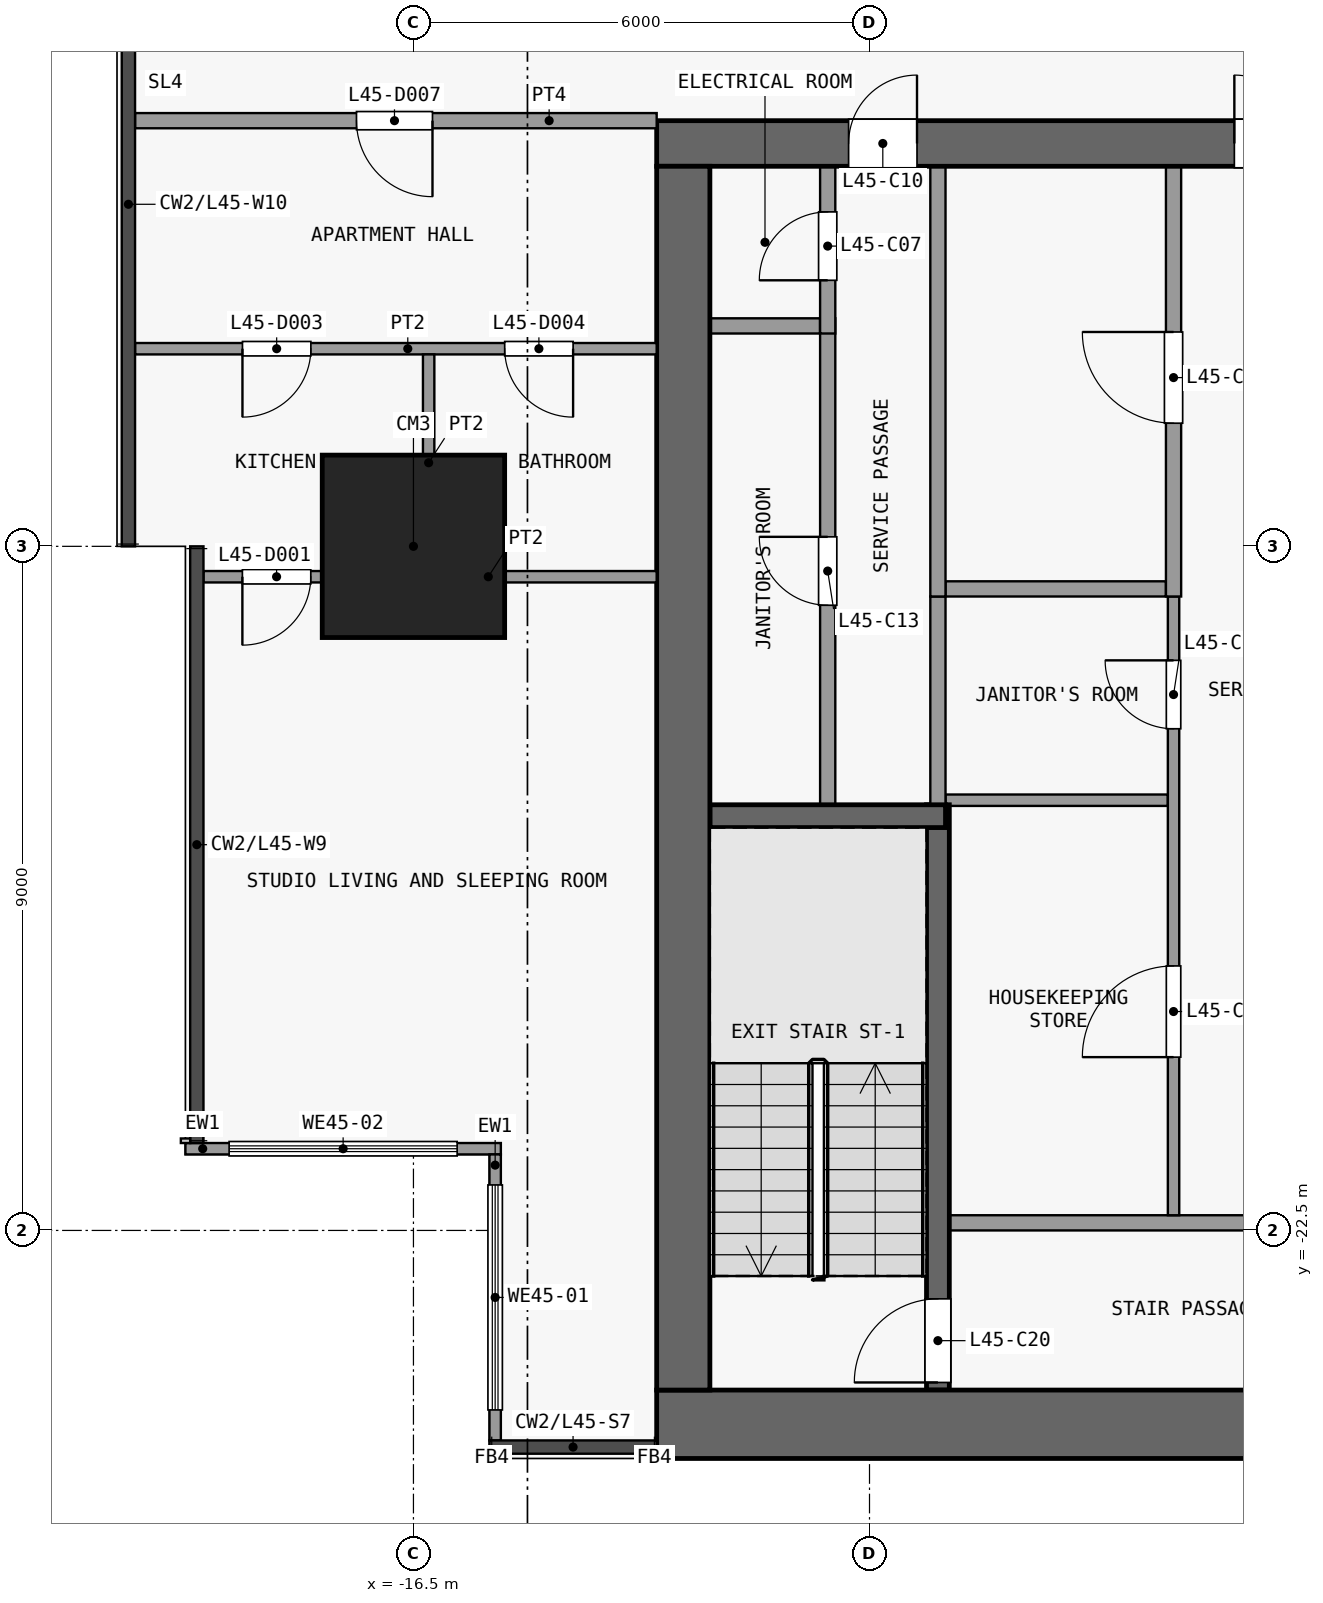
"""IFC4 building model, lengths in metres.
Left out: names, types, materials, properties, quantities, classifications, styles, units other than length and angle.
Written with IfcOpenShell. Run it as: python <this file> out.ifc"""

import sys

from ifc_helpers import new_model, si_unit, direction, frame, frame_2d, origin, origin_2d, place, context, subcontext, project, spatial, rectangle, extrude, element, fill, save


model = new_model("IFC4")
c1 = context("Model", 3, precision=1e-05, world=origin(), true_north=direction((0.0, 1.0)))
c2 = subcontext(c1, "Body", "Model", "MODEL_VIEW")
j1 = project(units=[si_unit("LENGTHUNIT", "METRE"), si_unit("PLANEANGLEUNIT", "RADIAN")], contexts=[c1])
p1 = place(None, origin())
s1 = spatial("IfcSite", under=j1, at=p1, CompositionType="ELEMENT")
p2 = place(p1, origin())
s2 = spatial("IfcBuilding", under=s1, at=p2, CompositionType="ELEMENT")
p3 = place(p2, frame((0.0, 0.0, 181.7)))
s3 = spatial("IfcBuildingStorey", under=s2, at=p3, CompositionType="ELEMENT", Elevation=181.7)
p4 = place(p3, frame((-16.5, -13.5, 0.0), z_axis=(0.0, 0.0, 1.0), x_axis=(1.0, 0.0, 0.0)))
e1 = element("IfcColumn", 1, at=p4, inside=s3, PredefinedType="COLUMN", context=c2, shape_type="SweptSolid", body=[
    extrude(rectangle(XDim=2.4, YDim=2.4, at=origin_2d()), origin(), (0.0, 0.0, 1.0), 3.6),
])
p5 = place(p3, frame((-13.3, -25.05, 0.0), z_axis=(0.0, 0.0, 1.0), x_axis=(1.0, 0.0, 0.0)))
e2 = element("IfcWall", 2, at=p5, inside=s3, PredefinedType="SHEAR", context=c2, shape_type="SweptSolid", body=[
    extrude(rectangle(XDim=26.6, YDim=0.9, at=frame_2d((13.3, 0.0))), origin(), (0.0, 0.0, 1.0), 3.3),
])
p6 = place(p3, frame((-13.3, -8.2, 0.0), z_axis=(0.0, 0.0, 1.0), x_axis=(1.0, 0.0, 0.0)))
e3 = element("IfcWall", 3, at=p6, inside=s3, PredefinedType="SHEAR", context=c2, shape_type="SweptSolid", body=[
    extrude(rectangle(XDim=26.6, YDim=0.6, at=frame_2d((13.3, 0.0))), origin(), (0.0, 0.0, 1.0), 3.3),
])
p7 = place(p6, frame((7.6, 0.0, 0.0)))
e4 = element("IfcOpeningElement", 4, at=p7, cuts=e3, PredefinedType="OPENING", context=c2, shape_type="SweptSolid", body=[
    extrude(rectangle(XDim=1.8, YDim=2.1, at=frame_2d((0.9, 1.05))), frame((0.0, 0.31, 0.0), z_axis=(0.0, -1.0, 0.0), x_axis=(1.0, 0.0, 0.0)), (0.0, 0.0, 1.0), 0.62),
])
p8 = place(p6, frame((17.2, 0.0, 0.0)))
e5 = element("IfcOpeningElement", 5, at=p8, cuts=e3, PredefinedType="OPENING", context=c2, shape_type="SweptSolid", body=[
    extrude(rectangle(XDim=1.8, YDim=2.1, at=frame_2d((0.9, 1.05))), frame((0.0, 0.31, 0.0), z_axis=(0.0, -1.0, 0.0), x_axis=(1.0, 0.0, 0.0)), (0.0, 0.0, 1.0), 0.62),
])
p9 = place(p6, frame((2.525, 0.0, 0.0)))
e6 = element("IfcOpeningElement", 6, at=p9, cuts=e3, PredefinedType="OPENING", context=c2, shape_type="SweptSolid", body=[
    extrude(rectangle(XDim=0.9, YDim=2.1, at=frame_2d((0.45, 1.05))), frame((0.0, 0.31, 0.0), z_axis=(0.0, -1.0, 0.0), x_axis=(1.0, 0.0, 0.0)), (0.0, 0.0, 1.0), 0.62),
])
p10 = place(p6, frame((23.175, 0.0, 0.0)))
e7 = element("IfcOpeningElement", 7, at=p10, cuts=e3, PredefinedType="OPENING", context=c2, shape_type="SweptSolid", body=[
    extrude(rectangle(XDim=0.9, YDim=2.1, at=frame_2d((0.45, 1.05))), frame((0.0, 0.31, 0.0), z_axis=(0.0, -1.0, 0.0), x_axis=(1.0, 0.0, 0.0)), (0.0, 0.0, 1.0), 0.62),
])
p11 = place(p3, frame((-12.95, -24.6, 0.0), z_axis=(0.0, 0.0, 1.0), x_axis=(0.0, 1.0, 0.0)))
e8 = element("IfcWall", 8, at=p11, inside=s3, PredefinedType="SHEAR", context=c2, shape_type="SweptSolid", body=[
    extrude(rectangle(XDim=16.1, YDim=0.7, at=frame_2d((8.05, 0.0))), origin(), (0.0, 0.0, 1.0), 3.3),
])
p12 = place(p3, frame((-3.25, -22.4, 0.0), z_axis=(0.0, 0.0, 1.0), x_axis=(-1.0, 0.0, 0.0)))
e9 = element("IfcWall", 9, at=p12, inside=s3, PredefinedType="PARTITIONING", context=c2, shape_type="SweptSolid", body=[
    extrude(rectangle(XDim=6.2, YDim=0.2, at=frame_2d((3.1, 0.0))), origin(), (0.0, 0.0, 1.0), 3.3),
])
p13 = place(p12, frame((0.8, 0.0, 0.0)))
e10 = element("IfcOpeningElement", 10, at=p13, cuts=e9, PredefinedType="OPENING", context=c2, shape_type="SweptSolid", body=[
    extrude(rectangle(XDim=1.5, YDim=2.1, at=frame_2d((0.75, 1.05))), frame((0.0, 0.11, 0.0), z_axis=(0.0, -1.0, 0.0), x_axis=(1.0, 0.0, 0.0)), (0.0, 0.0, 1.0), 0.22),
])
p14 = place(p3, frame((-12.6, -17.05, 0.0), z_axis=(0.0, 0.0, 1.0), x_axis=(1.0, 0.0, 0.0)))
e11 = element("IfcWall", 11, at=p14, inside=s3, PredefinedType="SHEAR", context=c2, shape_type="SweptSolid", body=[
    extrude(rectangle(XDim=3.1, YDim=0.3, at=frame_2d((1.55, 0.0))), origin(), (0.0, 0.0, 1.0), 3.3),
])
p15 = place(p3, frame((-9.5, -16.84, 0.0), z_axis=(0.0, 0.0, 1.0), x_axis=(1.0, 0.0, 0.0)))
e12 = element("IfcWall", 12, at=p15, inside=s3, PredefinedType="PARTITIONING", context=c2, shape_type="SweptSolid", body=[
    extrude(rectangle(XDim=2.925, YDim=0.15, at=frame_2d((1.462, 0.0))), origin(), (0.0, 0.0, 1.0), 3.3),
])
p16 = place(p3, frame((-9.5, -14.06, 0.0), z_axis=(0.0, 0.0, 1.0), x_axis=(1.0, 0.0, 0.0)))
e13 = element("IfcWall", 13, at=p16, inside=s3, PredefinedType="PARTITIONING", context=c2, shape_type="SweptSolid", body=[
    extrude(rectangle(XDim=2.9, YDim=0.2, at=frame_2d((1.45, 0.0))), origin(), (0.0, 0.0, 1.0), 3.3),
])
p17 = place(p3, frame((-12.6, -10.6, 0.0), z_axis=(0.0, 0.0, 1.0), x_axis=(1.0, 0.0, 0.0)))
e14 = element("IfcWall", 14, at=p17, inside=s3, PredefinedType="PARTITIONING", context=c2, shape_type="SweptSolid", body=[
    extrude(rectangle(XDim=1.45, YDim=0.2, at=frame_2d((0.725, 0.0))), origin(), (0.0, 0.0, 1.0), 3.3),
])
p18 = place(p3, frame((-11.05, -16.9, 0.0), z_axis=(0.0, 0.0, 1.0), x_axis=(0.0, 1.0, 0.0)))
e15 = element("IfcWall", 15, at=p18, inside=s3, PredefinedType="PARTITIONING", context=c2, shape_type="SweptSolid", body=[
    extrude(rectangle(XDim=6.4, YDim=0.2, at=frame_2d((3.2, 0.0))), origin(), (0.0, 0.0, 1.0), 3.3),
])
p19 = place(p18, frame((2.625, 0.0, 0.0)))
e16 = element("IfcOpeningElement", 16, at=p19, cuts=e15, PredefinedType="OPENING", context=c2, shape_type="SweptSolid", body=[
    extrude(rectangle(XDim=0.9, YDim=2.1, at=frame_2d((0.45, 1.05))), frame((0.0, 0.11, 0.0), z_axis=(0.0, -1.0, 0.0), x_axis=(1.0, 0.0, 0.0)), (0.0, 0.0, 1.0), 0.22),
])
p20 = place(p3, frame((-11.05, -10.7, 0.0), z_axis=(0.0, 0.0, 1.0), x_axis=(0.0, 1.0, 0.0)))
e17 = element("IfcWall", 17, at=p20, inside=s3, PredefinedType="PARTITIONING", context=c2, shape_type="SweptSolid", body=[
    extrude(rectangle(XDim=2.2, YDim=0.2, at=frame_2d((1.1, 0.0))), origin(), (0.0, 0.0, 1.0), 3.3),
])
p21 = place(p20, frame((0.7, 0.0, 0.0)))
e18 = element("IfcOpeningElement", 18, at=p21, cuts=e17, PredefinedType="OPENING", context=c2, shape_type="SweptSolid", body=[
    extrude(rectangle(XDim=0.9, YDim=2.1, at=frame_2d((0.45, 1.05))), frame((0.0, 0.11, 0.0), z_axis=(0.0, -1.0, 0.0), x_axis=(1.0, 0.0, 0.0)), (0.0, 0.0, 1.0), 0.22),
])
p22 = place(p3, frame((-9.6, -24.6, 0.0), z_axis=(0.0, 0.0, 1.0), x_axis=(0.0, 1.0, 0.0)))
e19 = element("IfcWall", 19, at=p22, inside=s3, PredefinedType="SHEAR", context=c2, shape_type="SweptSolid", body=[
    extrude(rectangle(XDim=7.7, YDim=0.3, at=frame_2d((3.85, 0.0))), origin(), (0.0, 0.0, 1.0), 3.3),
])
p23 = place(p22, frame((0.1, 0.0, 0.0)))
e20 = element("IfcOpeningElement", 20, at=p23, cuts=e19, PredefinedType="OPENING", context=c2, shape_type="SweptSolid", body=[
    extrude(rectangle(XDim=1.1, YDim=2.1, at=frame_2d((0.55, 1.05))), frame((0.0, 0.16, 0.0), z_axis=(0.0, -1.0, 0.0), x_axis=(1.0, 0.0, 0.0)), (0.0, 0.0, 1.0), 0.32),
])
p24 = place(p3, frame((-9.6, -16.9, 0.0), z_axis=(0.0, 0.0, 1.0), x_axis=(0.0, 1.0, 0.0)))
e21 = element("IfcWall", 21, at=p24, inside=s3, PredefinedType="PARTITIONING", context=c2, shape_type="SweptSolid", body=[
    extrude(rectangle(XDim=2.74, YDim=0.2, at=frame_2d((1.37, 0.0))), origin(), (0.0, 0.0, 1.0), 3.3),
])
p25 = place(p3, frame((-9.6, -14.16, 0.0), z_axis=(0.0, 0.0, 1.0), x_axis=(0.0, 1.0, 0.0)))
e22 = element("IfcWall", 22, at=p25, inside=s3, PredefinedType="PARTITIONING", context=c2, shape_type="SweptSolid", body=[
    extrude(rectangle(XDim=5.66, YDim=0.2, at=frame_2d((2.83, 0.0))), origin(), (0.0, 0.0, 1.0), 3.3),
])
p26 = place(p3, frame((-6.5, -22.3, 0.0), z_axis=(0.0, 0.0, 1.0), x_axis=(0.0, 1.0, 0.0)))
e23 = element("IfcWall", 23, at=p26, inside=s3, PredefinedType="PARTITIONING", context=c2, shape_type="SweptSolid", body=[
    extrude(rectangle(XDim=8.14, YDim=0.15, at=frame_2d((4.07, 0.0))), origin(), (0.0, 0.0, 1.0), 3.3),
])
p27 = place(p26, frame((2.08, 0.0, 0.0)))
e24 = element("IfcOpeningElement", 24, at=p27, cuts=e23, PredefinedType="OPENING", context=c2, shape_type="SweptSolid", body=[
    extrude(rectangle(XDim=1.2, YDim=2.1, at=frame_2d((0.6, 1.05))), frame((0.0, 0.085, 0.0), z_axis=(0.0, -1.0, 0.0), x_axis=(1.0, 0.0, 0.0)), (0.0, 0.0, 1.0), 0.17),
])
p28 = place(p26, frame((6.4, 0.0, 0.0)))
e25 = element("IfcOpeningElement", 25, at=p28, cuts=e23, PredefinedType="OPENING", context=c2, shape_type="SweptSolid", body=[
    extrude(rectangle(XDim=0.9, YDim=2.1, at=frame_2d((0.45, 1.05))), frame((0.0, 0.085, 0.0), z_axis=(0.0, -1.0, 0.0), x_axis=(1.0, 0.0, 0.0)), (0.0, 0.0, 1.0), 0.17),
])
p29 = place(p3, frame((-6.5, -14.16, 0.0), z_axis=(0.0, 0.0, 1.0), x_axis=(0.0, 1.0, 0.0)))
e26 = element("IfcWall", 26, at=p29, inside=s3, PredefinedType="PARTITIONING", context=c2, shape_type="SweptSolid", body=[
    extrude(rectangle(XDim=5.66, YDim=0.2, at=frame_2d((2.83, 0.0))), origin(), (0.0, 0.0, 1.0), 3.3),
])
p30 = place(p29, frame((2.28, 0.0, 0.0)))
e27 = element("IfcOpeningElement", 27, at=p30, cuts=e26, PredefinedType="OPENING", context=c2, shape_type="SweptSolid", body=[
    extrude(rectangle(XDim=1.2, YDim=2.1, at=frame_2d((0.6, 1.05))), frame((0.0, 0.11, 0.0), z_axis=(0.0, -1.0, 0.0), x_axis=(1.0, 0.0, 0.0)), (0.0, 0.0, 1.0), 0.22),
])
p31 = place(p3, frame((-15.425, -25.262, 0.0), z_axis=(0.0, 0.0, 1.0), x_axis=(0.0, 1.0, 0.0)))
e28 = element("IfcWall", 28, at=p31, inside=s3, PredefinedType="SOLIDWALL", context=c2, shape_type="SweptSolid", body=[
    extrude(rectangle(XDim=3.762, YDim=0.15, at=frame_2d((1.881, 0.0))), origin(), (0.0, 0.0, 1.0), 3.3),
])
p32 = place(p31, frame((0.401, 0.0, 0.9)))
e29 = element("IfcOpeningElement", 29, at=p32, cuts=e28, PredefinedType="OPENING", context=c2, shape_type="SweptSolid", body=[
    extrude(rectangle(XDim=2.96, YDim=2.4, at=frame_2d((1.48, 1.2))), frame((0.0, 0.085, 0.0), z_axis=(0.0, -1.0, 0.0), x_axis=(1.0, 0.0, 0.0)), (0.0, 0.0, 1.0), 0.17),
])
p33 = place(p3, frame((-15.35, -21.425, 0.0), z_axis=(0.0, 0.0, 1.0), x_axis=(-1.0, 0.0, 0.0)))
e30 = element("IfcWall", 30, at=p33, inside=s3, PredefinedType="SOLIDWALL", context=c2, shape_type="SweptSolid", body=[
    extrude(rectangle(XDim=4.15, YDim=0.15, at=frame_2d((2.075, 0.0))), origin(), (0.0, 0.0, 1.0), 3.3),
])
p34 = place(p33, frame((0.575, 0.0, 0.9)))
e31 = element("IfcOpeningElement", 31, at=p34, cuts=e30, PredefinedType="OPENING", context=c2, shape_type="SweptSolid", body=[
    extrude(rectangle(XDim=3.0, YDim=2.4, at=frame_2d((1.5, 1.2))), frame((0.0, 0.085, 0.0), z_axis=(0.0, -1.0, 0.0), x_axis=(1.0, 0.0, 0.0)), (0.0, 0.0, 1.0), 0.17),
])
p35 = place(p3, frame((-19.262, -13.9, 0.0), z_axis=(0.0, 0.0, 1.0), x_axis=(1.0, 0.0, 0.0)))
e32 = element("IfcWall", 32, at=p35, inside=s3, PredefinedType="PARTITIONING", context=c2, shape_type="SweptSolid", body=[
    extrude(rectangle(XDim=5.962, YDim=0.15, at=frame_2d((2.981, 0.0))), origin(), (0.0, 0.0, 1.0), 3.3),
])
p36 = place(p35, frame((0.512, 0.0, 0.0)))
e33 = element("IfcOpeningElement", 33, at=p36, cuts=e32, PredefinedType="OPENING", context=c2, shape_type="SweptSolid", body=[
    extrude(rectangle(XDim=0.9, YDim=2.1, at=frame_2d((0.45, 1.05))), frame((0.0, 0.085, 0.0), z_axis=(0.0, -1.0, 0.0), x_axis=(1.0, 0.0, 0.0)), (0.0, 0.0, 1.0), 0.17),
])
p37 = place(p3, frame((-20.163, -10.9, 0.0), z_axis=(0.0, 0.0, 1.0), x_axis=(1.0, 0.0, 0.0)))
e34 = element("IfcWall", 34, at=p37, inside=s3, PredefinedType="PARTITIONING", context=c2, shape_type="SweptSolid", body=[
    extrude(rectangle(XDim=6.863, YDim=0.15, at=frame_2d((3.431, 0.0))), origin(), (0.0, 0.0, 1.0), 3.3),
])
p38 = place(p37, frame((1.413, 0.0, 0.0)))
e35 = element("IfcOpeningElement", 35, at=p38, cuts=e34, PredefinedType="OPENING", context=c2, shape_type="SweptSolid", body=[
    extrude(rectangle(XDim=0.9, YDim=2.1, at=frame_2d((0.45, 1.05))), frame((0.0, 0.085, 0.0), z_axis=(0.0, -1.0, 0.0), x_axis=(1.0, 0.0, 0.0)), (0.0, 0.0, 1.0), 0.17),
])
p39 = place(p37, frame((4.863, 0.0, 0.0)))
e36 = element("IfcOpeningElement", 36, at=p39, cuts=e34, PredefinedType="OPENING", context=c2, shape_type="SweptSolid", body=[
    extrude(rectangle(XDim=0.9, YDim=2.1, at=frame_2d((0.45, 1.05))), frame((0.0, 0.085, 0.0), z_axis=(0.0, -1.0, 0.0), x_axis=(1.0, 0.0, 0.0)), (0.0, 0.0, 1.0), 0.17),
])
p40 = place(p3, frame((-20.163, -7.9, 0.0), z_axis=(0.0, 0.0, 1.0), x_axis=(1.0, 0.0, 0.0)))
e37 = element("IfcWall", 37, at=p40, inside=s3, PredefinedType="PARTITIONING", context=c2, shape_type="SweptSolid", body=[
    extrude(rectangle(XDim=6.863, YDim=0.2, at=frame_2d((3.431, 0.0))), origin(), (0.0, 0.0, 1.0), 3.3),
])
p41 = place(p40, frame((2.913, 0.0, 0.0)))
e38 = element("IfcOpeningElement", 38, at=p41, cuts=e37, PredefinedType="OPENING", context=c2, shape_type="SweptSolid", body=[
    extrude(rectangle(XDim=1.0, YDim=2.1, at=frame_2d((0.5, 1.05))), frame((0.0, 0.11, 0.0), z_axis=(0.0, -1.0, 0.0), x_axis=(1.0, 0.0, 0.0)), (0.0, 0.0, 1.0), 0.22),
])
p42 = place(p3, frame((-16.3, -13.825, 0.0), z_axis=(0.0, 0.0, 1.0), x_axis=(0.0, 1.0, 0.0)))
e39 = element("IfcWall", 39, at=p42, inside=s3, PredefinedType="PARTITIONING", context=c2, shape_type="SweptSolid", body=[
    extrude(rectangle(XDim=2.85, YDim=0.15, at=frame_2d((1.425, 0.0))), origin(), (0.0, 0.0, 1.0), 3.3),
])
p43 = place(p7, origin())
e40 = element("IfcDoor", 40, at=p43, inside=s3, OperationType="DOUBLE_DOOR_SINGLE_SWING", PredefinedType="DOOR", context=c2, shape_type="SweptSolid", body=[
    extrude(rectangle(XDim=1.8, YDim=2.1, at=frame_2d((0.9, 1.05))), frame((0.0, 0.025, 0.0), z_axis=(0.0, -1.0, 0.0), x_axis=(1.0, 0.0, 0.0)), (0.0, 0.0, 1.0), 0.05),
])
fill(e4, e40)
p44 = place(p21, origin())
e41 = element("IfcDoor", 41, at=p44, inside=s3, OperationType="SINGLE_SWING_LEFT", PredefinedType="DOOR", context=c2, shape_type="SweptSolid", body=[
    extrude(rectangle(XDim=0.9, YDim=2.1, at=frame_2d((0.45, 1.05))), frame((0.0, 0.025, 0.0), z_axis=(0.0, -1.0, 0.0), x_axis=(1.0, 0.0, 0.0)), (0.0, 0.0, 1.0), 0.05),
])
fill(e18, e41)
p45 = place(p30, origin())
e42 = element("IfcDoor", 42, at=p45, inside=s3, OperationType="SINGLE_SWING_RIGHT", PredefinedType="DOOR", context=c2, shape_type="SweptSolid", body=[
    extrude(rectangle(XDim=1.2, YDim=2.1, at=frame_2d((0.6, 1.05))), frame((0.0, 0.025, 0.0), z_axis=(0.0, -1.0, 0.0), x_axis=(1.0, 0.0, 0.0)), (0.0, 0.0, 1.0), 0.05),
])
fill(e27, e42)
p46 = place(p9, origin())
e43 = element("IfcDoor", 43, at=p46, inside=s3, OperationType="SINGLE_SWING_RIGHT", PredefinedType="DOOR", context=c2, shape_type="SweptSolid", body=[
    extrude(rectangle(XDim=0.9, YDim=2.1, at=frame_2d((0.45, 1.05))), frame((0.0, 0.025, 0.0), z_axis=(0.0, -1.0, 0.0), x_axis=(1.0, 0.0, 0.0)), (0.0, 0.0, 1.0), 0.05),
])
fill(e6, e43)
p47 = place(p19, origin())
e44 = element("IfcDoor", 44, at=p47, inside=s3, OperationType="SINGLE_SWING_RIGHT", PredefinedType="DOOR", context=c2, shape_type="SweptSolid", body=[
    extrude(rectangle(XDim=0.9, YDim=2.1, at=frame_2d((0.45, 1.05))), frame((0.0, 0.025, 0.0), z_axis=(0.0, -1.0, 0.0), x_axis=(1.0, 0.0, 0.0)), (0.0, 0.0, 1.0), 0.05),
])
fill(e16, e44)
p48 = place(p27, origin())
e45 = element("IfcDoor", 45, at=p48, inside=s3, OperationType="SINGLE_SWING_LEFT", PredefinedType="DOOR", context=c2, shape_type="SweptSolid", body=[
    extrude(rectangle(XDim=1.2, YDim=2.1, at=frame_2d((0.6, 1.05))), frame((0.0, 0.025, 0.0), z_axis=(0.0, -1.0, 0.0), x_axis=(1.0, 0.0, 0.0)), (0.0, 0.0, 1.0), 0.05),
])
fill(e24, e45)
p49 = place(p28, origin())
e46 = element("IfcDoor", 46, at=p49, inside=s3, OperationType="SINGLE_SWING_RIGHT", PredefinedType="DOOR", context=c2, shape_type="SweptSolid", body=[
    extrude(rectangle(XDim=0.9, YDim=2.1, at=frame_2d((0.45, 1.05))), frame((0.0, 0.025, 0.0), z_axis=(0.0, -1.0, 0.0), x_axis=(1.0, 0.0, 0.0)), (0.0, 0.0, 1.0), 0.05),
])
fill(e25, e46)
p50 = place(p23, origin())
e47 = element("IfcDoor", 47, at=p50, inside=s3, OperationType="SINGLE_SWING_LEFT", PredefinedType="DOOR", context=c2, shape_type="SweptSolid", body=[
    extrude(rectangle(XDim=1.1, YDim=2.1, at=frame_2d((0.55, 1.05))), frame((0.0, 0.025, 0.0), z_axis=(0.0, -1.0, 0.0), x_axis=(1.0, 0.0, 0.0)), (0.0, 0.0, 1.0), 0.05),
])
fill(e20, e47)
p51 = place(p32, origin())
e48 = element("IfcWindow", 48, at=p51, inside=s3, PartitioningType="SINGLE_PANEL", PredefinedType="WINDOW", context=c2, shape_type="SweptSolid", body=[
    extrude(rectangle(XDim=2.96, YDim=2.4, at=frame_2d((1.48, 1.2))), frame((0.0, 0.03, 0.0), z_axis=(0.0, -1.0, 0.0), x_axis=(1.0, 0.0, 0.0)), (0.0, 0.0, 1.0), 0.06),
])
fill(e29, e48)
p52 = place(p34, origin())
e49 = element("IfcWindow", 49, at=p52, inside=s3, PartitioningType="SINGLE_PANEL", PredefinedType="WINDOW", context=c2, shape_type="SweptSolid", body=[
    extrude(rectangle(XDim=3.0, YDim=2.4, at=frame_2d((1.5, 1.2))), frame((0.0, 0.03, 0.0), z_axis=(0.0, -1.0, 0.0), x_axis=(1.0, 0.0, 0.0)), (0.0, 0.0, 1.0), 0.06),
])
fill(e31, e49)
p53 = place(p36, origin())
e50 = element("IfcDoor", 50, at=p53, inside=s3, OperationType="SINGLE_SWING_LEFT", PredefinedType="DOOR", context=c2, shape_type="SweptSolid", body=[
    extrude(rectangle(XDim=0.9, YDim=2.1, at=frame_2d((0.45, 1.05))), frame((0.0, 0.025, 0.0), z_axis=(0.0, -1.0, 0.0), x_axis=(1.0, 0.0, 0.0)), (0.0, 0.0, 1.0), 0.05),
])
fill(e33, e50)
p54 = place(p38, origin())
e51 = element("IfcDoor", 51, at=p54, inside=s3, OperationType="SINGLE_SWING_LEFT", PredefinedType="DOOR", context=c2, shape_type="SweptSolid", body=[
    extrude(rectangle(XDim=0.9, YDim=2.1, at=frame_2d((0.45, 1.05))), frame((0.0, 0.025, 0.0), z_axis=(0.0, -1.0, 0.0), x_axis=(1.0, 0.0, 0.0)), (0.0, 0.0, 1.0), 0.05),
])
fill(e35, e51)
p55 = place(p39, origin())
e52 = element("IfcDoor", 52, at=p55, inside=s3, OperationType="SINGLE_SWING_RIGHT", PredefinedType="DOOR", context=c2, shape_type="SweptSolid", body=[
    extrude(rectangle(XDim=0.9, YDim=2.1, at=frame_2d((0.45, 1.05))), frame((0.0, 0.025, 0.0), z_axis=(0.0, -1.0, 0.0), x_axis=(1.0, 0.0, 0.0)), (0.0, 0.0, 1.0), 0.05),
])
fill(e36, e52)
p56 = place(p41, origin())
e53 = element("IfcDoor", 53, at=p56, inside=s3, OperationType="SINGLE_SWING_RIGHT", PredefinedType="DOOR", context=c2, shape_type="SweptSolid", body=[
    extrude(rectangle(XDim=1.0, YDim=2.1, at=frame_2d((0.5, 1.05))), frame((0.0, 0.025, 0.0), z_axis=(0.0, -1.0, 0.0), x_axis=(1.0, 0.0, 0.0)), (0.0, 0.0, 1.0), 0.05),
])
fill(e38, e53)
save(model, sys.argv[1])
